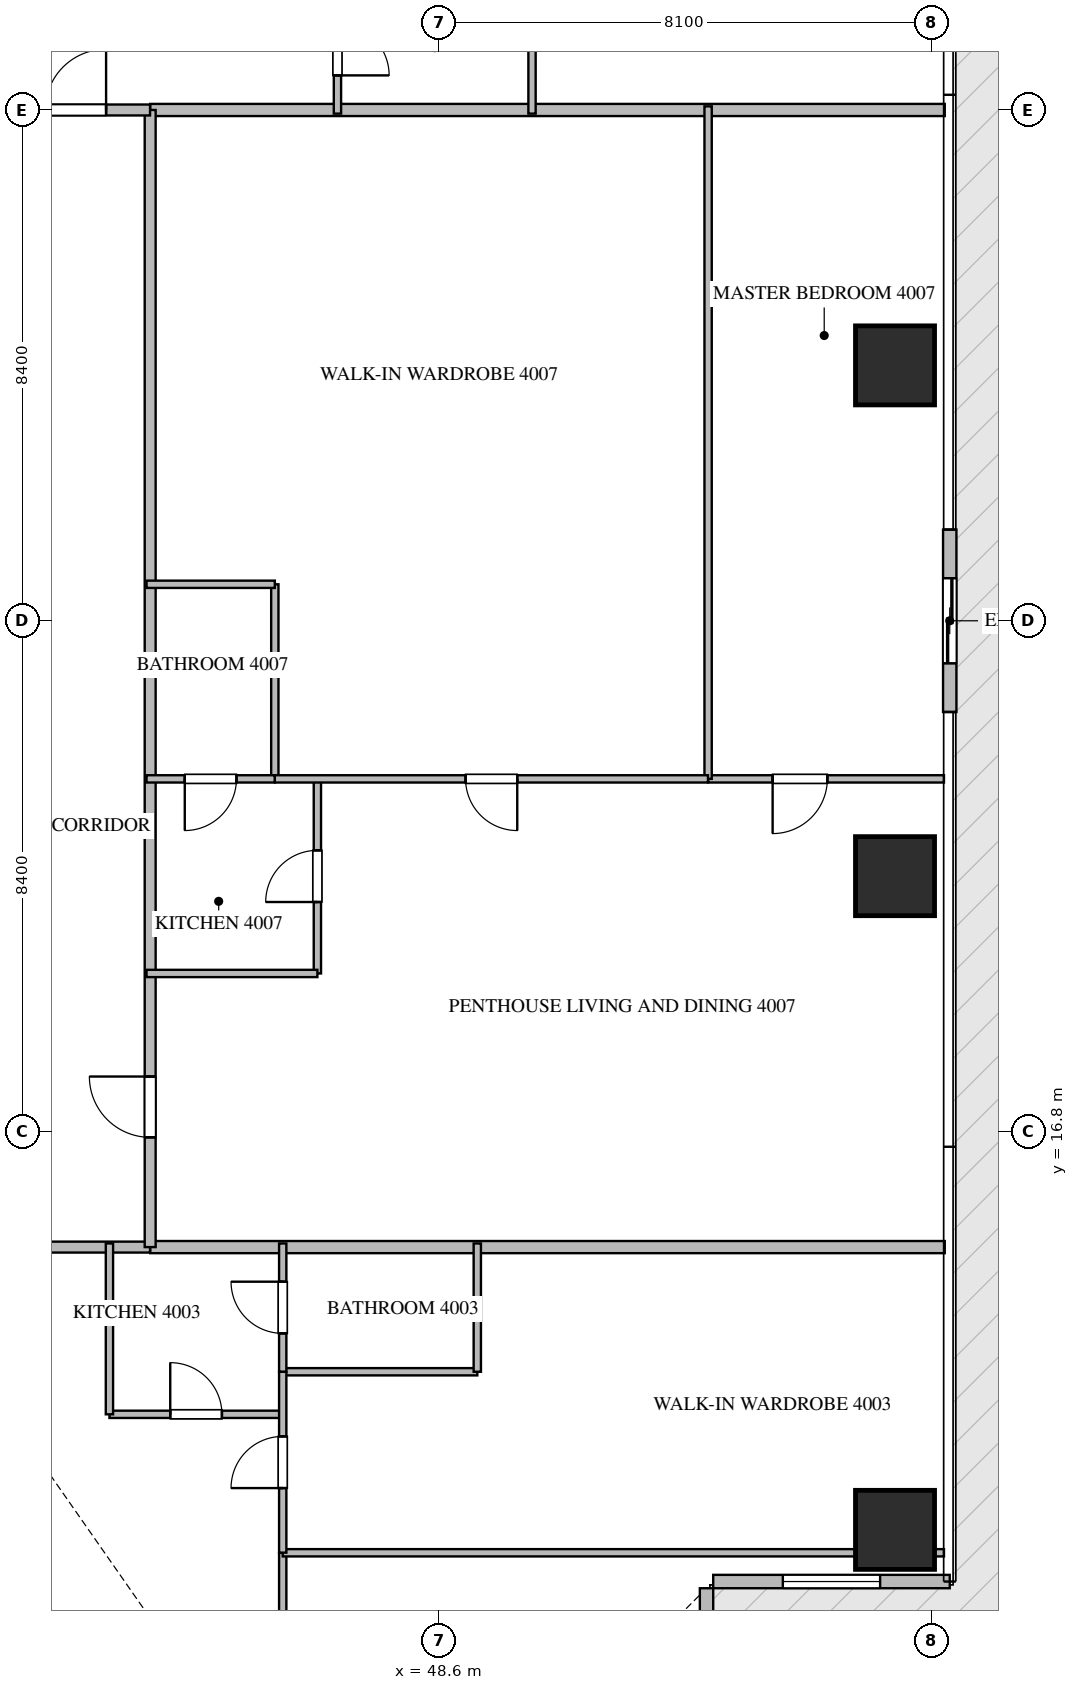
"""IFC4 building model, lengths in metres.
Left out: names, types, materials, properties, quantities, classifications, styles, units other than length and angle.
Written with IfcOpenShell. Run it as: python <this file> out.ifc"""

import sys

from ifc_helpers import new_model, si_unit, direction, frame, frame_2d, origin, origin_2d, place, context, subcontext, project, spatial, rectangle, extrude, source, transform, mapped, element, fill, save


model = new_model("IFC4")
c1 = context("Model", 3, precision=1e-05, world=origin(), true_north=direction((0.0, 1.0)))
c2 = subcontext(c1, "Body", "Model", "MODEL_VIEW")
j1 = project(units=[si_unit("LENGTHUNIT", "METRE"), si_unit("PLANEANGLEUNIT", "RADIAN")], contexts=[c1])
p1 = place(None, origin())
s1 = spatial("IfcSite", under=j1, at=p1, CompositionType="ELEMENT")
p2 = place(p1, origin())
s2 = spatial("IfcBuilding", under=s1, at=p2, CompositionType="ELEMENT")
p3 = place(p2, frame((0.0, 0.0, 161.4)))
s3 = spatial("IfcBuildingStorey", under=s2, at=p3, CompositionType="ELEMENT", Elevation=161.4)
m1 = source(origin(), c2, "Body", "SweptSolid", [
    extrude(rectangle(XDim=1.3, YDim=1.3, at=origin_2d()), origin(), (0.0, 0.0, 1.0), 3.75),
])
for number, where, z_axis, x_axis in (
    (1, (56.1, 10.25, -0.26), (0.0, 0.0, 1.0), (1.0, 0.0, 0.0)),
    (2, (56.1, 21.0, -0.26), (0.0, 0.0, 1.0), (1.0, 0.0, 0.0)),
    (3, (56.1, 29.4, -0.26), (0.0, 0.0, 1.0), (1.0, 0.0, 0.0)),
):
    element("IfcColumn", number, at=place(p3, frame(where, z_axis=z_axis, x_axis=x_axis)), inside=s3, PredefinedType="COLUMN", context=c2, shape_type="MappedRepresentation", body=[
        mapped(m1, transform((0.0, 0.0, 0.0), scale=1.0)),
    ])
p4 = place(p3, frame((53.0, 5.51, 0.0), z_axis=(0.0, 0.0, 1.0), x_axis=(0.0, 1.0, 0.0)))
e4 = element("IfcWall", 4, at=p4, inside=s3, PredefinedType="ELEMENTEDWALL", context=c2, shape_type="SweptSolid", body=[
    extrude(rectangle(XDim=3.78, YDim=0.22, at=frame_2d((1.89, 0.0))), origin(), (0.0, 0.0, 1.0), 3.475),
])
p5 = place(p4, frame((1.09, 0.0, 0.65)))
e5 = element("IfcOpeningElement", 5, at=p5, cuts=e4, PredefinedType="OPENING", context=c2, shape_type="SweptSolid", body=[
    extrude(rectangle(XDim=1.6, YDim=2.1, at=frame_2d((0.8, 1.05))), frame((0.0, 0.12, 0.0), z_axis=(0.0, -1.0, 0.0), x_axis=(1.0, 0.0, 0.0)), (0.0, 0.0, 1.0), 0.24),
])
p6 = place(p3, frame((53.11, 9.4, 0.0), z_axis=(0.0, 0.0, 1.0), x_axis=(1.0, 0.0, 0.0)))
e6 = element("IfcWall", 6, at=p6, inside=s3, PredefinedType="ELEMENTEDWALL", context=c2, shape_type="SweptSolid", body=[
    extrude(rectangle(XDim=3.89, YDim=0.22, at=frame_2d((1.945, 0.0))), origin(), (0.0, 0.0, 1.0), 3.475),
])
p7 = place(p6, frame((1.145, 0.0, 0.65)))
e7 = element("IfcOpeningElement", 7, at=p7, cuts=e6, PredefinedType="OPENING", context=c2, shape_type="SweptSolid", body=[
    extrude(rectangle(XDim=1.6, YDim=2.1, at=frame_2d((0.8, 1.05))), frame((0.0, 0.12, 0.0), z_axis=(0.0, -1.0, 0.0), x_axis=(1.0, 0.0, 0.0)), (0.0, 0.0, 1.0), 0.24),
])
p8 = place(p3, frame((57.0, 23.7, 0.0), z_axis=(0.0, 0.0, 1.0), x_axis=(0.0, 1.0, 0.0)))
e8 = element("IfcWall", 8, at=p8, inside=s3, PredefinedType="ELEMENTEDWALL", context=c2, shape_type="SweptSolid", body=[
    extrude(rectangle(XDim=3.0, YDim=0.22, at=frame_2d((1.5, 0.0))), origin(), (0.0, 0.0, 1.0), 3.475),
])
p9 = place(p8, frame((0.8, 0.0, 0.0)))
e9 = element("IfcOpeningElement", 9, at=p9, cuts=e8, PredefinedType="OPENING", context=c2, shape_type="SweptSolid", body=[
    extrude(rectangle(XDim=1.4, YDim=2.25, at=frame_2d((0.7, 1.125))), frame((0.0, 0.12, 0.0), z_axis=(0.0, -1.0, 0.0), x_axis=(1.0, 0.0, 0.0)), (0.0, 0.0, 1.0), 0.24),
])
for number, where, z_axis, x_axis in (
    (10, (43.85, 14.9, 0.0), (0.0, 0.0, 1.0), (1.0, 0.0, 0.0)),
    (11, (43.85, 33.6, 0.0), (0.0, 0.0, 1.0), (1.0, 0.0, 0.0)),
):
    element("IfcWall", number, at=place(p3, frame(where, z_axis=z_axis, x_axis=x_axis)), inside=s3, PredefinedType="PARTITIONING", context=c2, shape_type="SweptSolid", body=[
        extrude(rectangle(XDim=13.068, YDim=0.2, at=frame_2d((6.534, 0.0))), origin(), (0.0, 0.0, 1.0), 3.49),
    ])
p10 = place(p3, frame((20.952, 14.9, 0.0), z_axis=(0.0, 0.0, 1.0), x_axis=(1.0, 0.0, 0.0)))
e12 = element("IfcWall", 12, at=p10, inside=s3, PredefinedType="PARTITIONING", context=c2, shape_type="SweptSolid", body=[
    extrude(rectangle(XDim=22.896, YDim=0.18, at=frame_2d((11.448, 0.0))), origin(), (0.0, 0.0, 1.0), 3.49),
])
p11 = place(p10, frame((2.19, 0.0, 0.0)))
e13 = element("IfcOpeningElement", 13, at=p11, cuts=e12, PredefinedType="OPENING", context=c2, shape_type="SweptSolid", body=[
    extrude(rectangle(XDim=1.0, YDim=2.15, at=frame_2d((0.5, 1.075))), frame((0.0, 0.1, 0.0), z_axis=(0.0, -1.0, 0.0), x_axis=(1.0, 0.0, 0.0)), (0.0, 0.0, 1.0), 0.2),
])
p12 = place(p10, frame((15.24, 0.0, 0.0)))
e14 = element("IfcOpeningElement", 14, at=p12, cuts=e12, PredefinedType="OPENING", context=c2, shape_type="SweptSolid", body=[
    extrude(rectangle(XDim=1.0, YDim=2.15, at=frame_2d((0.5, 1.075))), frame((0.0, 0.1, 0.0), z_axis=(0.0, -1.0, 0.0), x_axis=(1.0, 0.0, 0.0)), (0.0, 0.0, 1.0), 0.2),
])
p13 = place(p10, frame((19.706, 0.0, 0.0)))
e15 = element("IfcOpeningElement", 15, at=p13, cuts=e12, PredefinedType="OPENING", context=c2, shape_type="SweptSolid", body=[
    extrude(rectangle(XDim=1.0, YDim=2.15, at=frame_2d((0.5, 1.075))), frame((0.0, 0.1, 0.0), z_axis=(0.0, -1.0, 0.0), x_axis=(1.0, 0.0, 0.0)), (0.0, 0.0, 1.0), 0.2),
])
p14 = place(p3, frame((43.85, 14.9, 0.0), z_axis=(0.0, 0.0, 1.0), x_axis=(0.0, 1.0, 0.0)))
e16 = element("IfcWall", 16, at=p14, inside=s3, PredefinedType="PARTITIONING", context=c2, shape_type="SweptSolid", body=[
    extrude(rectangle(XDim=18.7, YDim=0.18, at=frame_2d((9.35, 0.0))), origin(), (0.0, 0.0, 1.0), 3.49),
])
p15 = place(p14, frame((1.805, 0.0, 0.0)))
e17 = element("IfcOpeningElement", 17, at=p15, cuts=e16, PredefinedType="OPENING", context=c2, shape_type="SweptSolid", body=[
    extrude(rectangle(XDim=1.0, YDim=2.15, at=frame_2d((0.5, 1.075))), frame((0.0, 0.1, 0.0), z_axis=(0.0, -1.0, 0.0), x_axis=(1.0, 0.0, 0.0)), (0.0, 0.0, 1.0), 0.2),
])
p16 = place(p3, frame((41.402, 33.6, 0.0), z_axis=(0.0, 0.0, 1.0), x_axis=(1.0, 0.0, 0.0)))
e18 = element("IfcWall", 18, at=p16, inside=s3, PredefinedType="PARTITIONING", context=c2, shape_type="SweptSolid", body=[
    extrude(rectangle(XDim=2.446, YDim=0.18, at=frame_2d((1.223, 0.0))), origin(), (0.0, 0.0, 1.0), 3.49),
])
p17 = place(p16, frame((0.723, 0.0, 0.0)))
e19 = element("IfcOpeningElement", 19, at=p17, cuts=e18, PredefinedType="OPENING", context=c2, shape_type="SweptSolid", body=[
    extrude(rectangle(XDim=1.0, YDim=2.15, at=frame_2d((0.5, 1.075))), frame((0.0, 0.1, 0.0), z_axis=(0.0, -1.0, 0.0), x_axis=(1.0, 0.0, 0.0)), (0.0, 0.0, 1.0), 0.2),
])
p18 = place(p3, frame((43.18, 12.15, 0.0), z_axis=(0.0, 0.0, 1.0), x_axis=(1.0, 0.0, 0.0)))
e20 = element("IfcWall", 20, at=p18, inside=s3, PredefinedType="PARTITIONING", context=c2, shape_type="SweptSolid", body=[
    extrude(rectangle(XDim=2.85, YDim=0.12, at=frame_2d((1.425, 0.0))), origin(), (0.0, 0.0, 1.0), 3.49),
])
p19 = place(p18, frame((1.0, 0.0, 0.0)))
e21 = element("IfcOpeningElement", 21, at=p19, cuts=e20, PredefinedType="OPENING", context=c2, shape_type="SweptSolid", body=[
    extrude(rectangle(XDim=0.85, YDim=2.1, at=frame_2d((0.425, 1.05))), frame((0.0, 0.07, 0.0), z_axis=(0.0, -1.0, 0.0), x_axis=(1.0, 0.0, 0.0)), (0.0, 0.0, 1.0), 0.14),
])
p20 = place(p3, frame((43.18, 12.15, 0.0), z_axis=(0.0, 0.0, 1.0), x_axis=(0.0, 1.0, 0.0)))
e22 = element("IfcWall", 22, at=p20, inside=s3, PredefinedType="PARTITIONING", context=c2, shape_type="SweptSolid", body=[
    extrude(rectangle(XDim=2.81, YDim=0.12, at=frame_2d((1.405, 0.0))), origin(), (0.0, 0.0, 1.0), 3.49),
])
p21 = place(p3, frame((46.03, 1.495, 0.0), z_axis=(0.0, 0.0, 1.0), x_axis=(0.0, 1.0, 0.0)))
e23 = element("IfcWall", 23, at=p21, inside=s3, PredefinedType="PARTITIONING", context=c2, shape_type="SweptSolid", body=[
    extrude(rectangle(XDim=8.378, YDim=0.12, at=frame_2d((4.189, 0.0))), origin(), (0.0, 0.0, 1.0), 3.49),
])
p22 = place(p21, frame((4.113, 0.0, 0.0)))
e24 = element("IfcOpeningElement", 24, at=p22, cuts=e23, PredefinedType="OPENING", context=c2, shape_type="SweptSolid", body=[
    extrude(rectangle(XDim=0.9, YDim=2.1, at=frame_2d((0.45, 1.05))), frame((0.0, 0.07, 0.0), z_axis=(0.0, -1.0, 0.0), x_axis=(1.0, 0.0, 0.0)), (0.0, 0.0, 1.0), 0.14),
])
p23 = place(p3, frame((46.03, 9.873, 0.0), z_axis=(0.0, 0.0, 1.0), x_axis=(1.0, 0.0, 0.0)))
e25 = element("IfcWall", 25, at=p23, inside=s3, PredefinedType="PARTITIONING", context=c2, shape_type="SweptSolid", body=[
    extrude(rectangle(XDim=10.875, YDim=0.12, at=frame_2d((5.438, 0.0))), origin(), (0.0, 0.0, 1.0), 3.49),
])
p24 = place(p3, frame((46.03, 12.85, 0.0), z_axis=(0.0, 0.0, 1.0), x_axis=(1.0, 0.0, 0.0)))
e26 = element("IfcWall", 26, at=p24, inside=s3, PredefinedType="PARTITIONING", context=c2, shape_type="SweptSolid", body=[
    extrude(rectangle(XDim=3.2, YDim=0.12, at=frame_2d((1.6, 0.0))), origin(), (0.0, 0.0, 1.0), 3.49),
])
p25 = place(p3, frame((49.23, 12.85, 0.0), z_axis=(0.0, 0.0, 1.0), x_axis=(0.0, 1.0, 0.0)))
e27 = element("IfcWall", 27, at=p25, inside=s3, PredefinedType="PARTITIONING", context=c2, shape_type="SweptSolid", body=[
    extrude(rectangle(XDim=2.11, YDim=0.12, at=frame_2d((1.055, 0.0))), origin(), (0.0, 0.0, 1.0), 3.49),
])
p26 = place(p3, frame((46.03, 9.875, 0.0), z_axis=(0.0, 0.0, 1.0), x_axis=(0.0, 1.0, 0.0)))
e28 = element("IfcWall", 28, at=p26, inside=s3, PredefinedType="PARTITIONING", context=c2, shape_type="SweptSolid", body=[
    extrude(rectangle(XDim=2.975, YDim=0.12, at=frame_2d((1.488, 0.0))), origin(), (0.0, 0.0, 1.0), 3.49),
])
p27 = place(p26, frame((1.062, 0.0, 0.0)))
e29 = element("IfcOpeningElement", 29, at=p27, cuts=e28, PredefinedType="OPENING", context=c2, shape_type="SweptSolid", body=[
    extrude(rectangle(XDim=0.85, YDim=2.1, at=frame_2d((0.425, 1.05))), frame((0.0, 0.07, 0.0), z_axis=(0.0, -1.0, 0.0), x_axis=(1.0, 0.0, 0.0)), (0.0, 0.0, 1.0), 0.14),
])
p28 = place(p3, frame((46.03, 12.852, 0.0), z_axis=(0.0, 0.0, 1.0), x_axis=(0.0, 1.0, 0.0)))
e30 = element("IfcWall", 30, at=p28, inside=s3, PredefinedType="PARTITIONING", context=c2, shape_type="SweptSolid", body=[
    extrude(rectangle(XDim=2.108, YDim=0.12, at=frame_2d((1.054, 0.0))), origin(), (0.0, 0.0, 1.0), 3.49),
])
p29 = place(p28, frame((0.629, 0.0, 0.0)))
e31 = element("IfcOpeningElement", 31, at=p29, cuts=e30, PredefinedType="OPENING", context=c2, shape_type="SweptSolid", body=[
    extrude(rectangle(XDim=0.85, YDim=2.1, at=frame_2d((0.425, 1.05))), frame((0.0, 0.07, 0.0), z_axis=(0.0, -1.0, 0.0), x_axis=(1.0, 0.0, 0.0)), (0.0, 0.0, 1.0), 0.14),
])
p30 = place(p3, frame((50.13, 35.65, 0.0), z_axis=(0.0, 0.0, 1.0), x_axis=(0.0, -1.0, 0.0)))
e32 = element("IfcWall", 32, at=p30, inside=s3, PredefinedType="PARTITIONING", context=c2, shape_type="SweptSolid", body=[
    extrude(rectangle(XDim=2.11, YDim=0.12, at=frame_2d((1.055, 0.0))), origin(), (0.0, 0.0, 1.0), 3.49),
])
p31 = place(p3, frame((46.93, 35.648, 0.0), z_axis=(0.0, 0.0, 1.0), x_axis=(0.0, -1.0, 0.0)))
e33 = element("IfcWall", 33, at=p31, inside=s3, PredefinedType="PARTITIONING", context=c2, shape_type="SweptSolid", body=[
    extrude(rectangle(XDim=2.108, YDim=0.12, at=frame_2d((1.054, 0.0))), origin(), (0.0, 0.0, 1.0), 3.49),
])
p32 = place(p31, frame((0.629, 0.0, 0.0)))
e34 = element("IfcOpeningElement", 34, at=p32, cuts=e33, PredefinedType="OPENING", context=c2, shape_type="SweptSolid", body=[
    extrude(rectangle(XDim=0.85, YDim=2.1, at=frame_2d((0.425, 1.05))), frame((0.0, 0.07, 0.0), z_axis=(0.0, -1.0, 0.0), x_axis=(1.0, 0.0, 0.0)), (0.0, 0.0, 1.0), 0.14),
])
p33 = place(p3, frame((46.6, 19.4, 0.0), z_axis=(0.0, 0.0, 1.0), x_axis=(0.0, 1.0, 0.0)))
e35 = element("IfcWall", 35, at=p33, inside=s3, PredefinedType="PARTITIONING", context=c2, shape_type="SweptSolid", body=[
    extrude(rectangle(XDim=3.2, YDim=0.12, at=frame_2d((1.6, 0.0))), origin(), (0.0, 0.0, 1.0), 3.49),
])
p34 = place(p33, frame((1.175, 0.0, 0.0)))
e36 = element("IfcOpeningElement", 36, at=p34, cuts=e35, PredefinedType="OPENING", context=c2, shape_type="SweptSolid", body=[
    extrude(rectangle(XDim=0.85, YDim=2.1, at=frame_2d((0.425, 1.05))), frame((0.0, 0.07, 0.0), z_axis=(0.0, -1.0, 0.0), x_axis=(1.0, 0.0, 0.0)), (0.0, 0.0, 1.0), 0.14),
])
p35 = place(p3, frame((46.6, 19.4, 0.0), z_axis=(0.0, 0.0, 1.0), x_axis=(-1.0, 0.0, 0.0)))
e37 = element("IfcWall", 37, at=p35, inside=s3, PredefinedType="PARTITIONING", context=c2, shape_type="SweptSolid", body=[
    extrude(rectangle(XDim=2.81, YDim=0.12, at=frame_2d((1.405, 0.0))), origin(), (0.0, 0.0, 1.0), 3.49),
])
p36 = place(p3, frame((56.905, 22.6, 0.0), z_axis=(0.0, 0.0, 1.0), x_axis=(-1.0, 0.0, 0.0)))
e38 = element("IfcWall", 38, at=p36, inside=s3, PredefinedType="PARTITIONING", context=c2, shape_type="SweptSolid", body=[
    extrude(rectangle(XDim=3.879, YDim=0.12, at=frame_2d((1.939, 0.0))), origin(), (0.0, 0.0, 1.0), 3.49),
])
p37 = place(p36, frame((1.918, 0.0, 0.0)))
e39 = element("IfcOpeningElement", 39, at=p37, cuts=e38, PredefinedType="OPENING", context=c2, shape_type="SweptSolid", body=[
    extrude(rectangle(XDim=0.9, YDim=2.1, at=frame_2d((0.45, 1.05))), frame((0.0, 0.07, 0.0), z_axis=(0.0, -1.0, 0.0), x_axis=(1.0, 0.0, 0.0)), (0.0, 0.0, 1.0), 0.14),
])
p38 = place(p3, frame((53.026, 22.6, 0.0), z_axis=(0.0, 0.0, 1.0), x_axis=(0.0, 1.0, 0.0)))
e40 = element("IfcWall", 40, at=p38, inside=s3, PredefinedType="PARTITIONING", context=c2, shape_type="SweptSolid", body=[
    extrude(rectangle(XDim=11.06, YDim=0.12, at=frame_2d((5.53, 0.0))), origin(), (0.0, 0.0, 1.0), 3.49),
])
p39 = place(p3, frame((45.9, 22.6, 0.0), z_axis=(0.0, 0.0, 1.0), x_axis=(0.0, 1.0, 0.0)))
e41 = element("IfcWall", 41, at=p39, inside=s3, PredefinedType="PARTITIONING", context=c2, shape_type="SweptSolid", body=[
    extrude(rectangle(XDim=3.2, YDim=0.12, at=frame_2d((1.6, 0.0))), origin(), (0.0, 0.0, 1.0), 3.49),
])
p40 = place(p3, frame((45.9, 25.8, 0.0), z_axis=(0.0, 0.0, 1.0), x_axis=(-1.0, 0.0, 0.0)))
e42 = element("IfcWall", 42, at=p40, inside=s3, PredefinedType="PARTITIONING", context=c2, shape_type="SweptSolid", body=[
    extrude(rectangle(XDim=2.11, YDim=0.12, at=frame_2d((1.055, 0.0))), origin(), (0.0, 0.0, 1.0), 3.49),
])
p41 = place(p3, frame((53.024, 22.6, 0.0), z_axis=(0.0, 0.0, 1.0), x_axis=(-1.0, 0.0, 0.0)))
e43 = element("IfcWall", 43, at=p41, inside=s3, PredefinedType="PARTITIONING", context=c2, shape_type="SweptSolid", body=[
    extrude(rectangle(XDim=7.124, YDim=0.12, at=frame_2d((3.562, 0.0))), origin(), (0.0, 0.0, 1.0), 3.49),
])
p42 = place(p41, frame((3.137, 0.0, 0.0)))
e44 = element("IfcOpeningElement", 44, at=p42, cuts=e43, PredefinedType="OPENING", context=c2, shape_type="SweptSolid", body=[
    extrude(rectangle(XDim=0.85, YDim=2.1, at=frame_2d((0.425, 1.05))), frame((0.0, 0.07, 0.0), z_axis=(0.0, -1.0, 0.0), x_axis=(1.0, 0.0, 0.0)), (0.0, 0.0, 1.0), 0.14),
])
p43 = place(p3, frame((45.898, 22.6, 0.0), z_axis=(0.0, 0.0, 1.0), x_axis=(-1.0, 0.0, 0.0)))
e45 = element("IfcWall", 45, at=p43, inside=s3, PredefinedType="PARTITIONING", context=c2, shape_type="SweptSolid", body=[
    extrude(rectangle(XDim=2.108, YDim=0.12, at=frame_2d((1.054, 0.0))), origin(), (0.0, 0.0, 1.0), 3.49),
])
p44 = place(p43, frame((0.629, 0.0, 0.0)))
e46 = element("IfcOpeningElement", 46, at=p44, cuts=e45, PredefinedType="OPENING", context=c2, shape_type="SweptSolid", body=[
    extrude(rectangle(XDim=0.85, YDim=2.1, at=frame_2d((0.425, 1.05))), frame((0.0, 0.07, 0.0), z_axis=(0.0, -1.0, 0.0), x_axis=(1.0, 0.0, 0.0)), (0.0, 0.0, 1.0), 0.14),
])
m2 = source(origin(), c2, "Body", "SweptSolid", [
    extrude(rectangle(XDim=1.6, YDim=2.1, at=frame_2d((0.8, 1.05))), frame((0.0, 0.03, 0.0), z_axis=(0.0, -1.0, 0.0), x_axis=(1.0, 0.0, 0.0)), (0.0, 0.0, 1.0), 0.06),
])
p45 = place(p7, origin())
e47 = element("IfcWindow", 47, at=p45, inside=s3, PartitioningType="SINGLE_PANEL", PredefinedType="WINDOW", context=c2, shape_type="MappedRepresentation", body=[
    mapped(m2, transform((0.0, 0.0, 0.0), scale=1.0)),
])
fill(e7, e47)
m3 = source(origin(), c2, "Body", "SweptSolid", [
    extrude(rectangle(XDim=1.4, YDim=2.25, at=frame_2d((0.7, 1.125))), frame((0.0, 0.025, 0.0), z_axis=(0.0, -1.0, 0.0), x_axis=(1.0, 0.0, 0.0)), (0.0, 0.0, 1.0), 0.05),
])
p46 = place(p9, origin())
e48 = element("IfcDoor", 48, at=p46, inside=s3, OperationType="SLIDING_TO_LEFT", PredefinedType="DOOR", context=c2, shape_type="MappedRepresentation", body=[
    mapped(m3, transform((0.0, 0.0, 0.0), scale=1.0)),
])
fill(e9, e48)
m4 = source(origin(), c2, "Body", "SweptSolid", [
    extrude(rectangle(XDim=1.0, YDim=2.15, at=frame_2d((0.5, 1.075))), frame((0.0, 0.025, 0.0), z_axis=(0.0, -1.0, 0.0), x_axis=(1.0, 0.0, 0.0)), (0.0, 0.0, 1.0), 0.05),
])
p47 = place(p15, origin())
e49 = element("IfcDoor", 49, at=p47, inside=s3, OperationType="SINGLE_SWING_RIGHT", PredefinedType="DOOR", context=c2, shape_type="MappedRepresentation", body=[
    mapped(m4, transform((0.0, 0.0, 0.0), scale=1.0)),
])
fill(e17, e49)
p48 = place(p17, origin())
e50 = element("IfcDoor", 50, at=p48, inside=s3, OperationType="SINGLE_SWING_RIGHT", PredefinedType="DOOR", context=c2, shape_type="MappedRepresentation", body=[
    mapped(m4, transform((0.0, 0.0, 0.0), scale=1.0)),
])
fill(e19, e50)
m5 = source(origin(), c2, "Body", "SweptSolid", [
    extrude(rectangle(XDim=0.85, YDim=2.1, at=frame_2d((0.425, 1.05))), frame((0.0, 0.025, 0.0), z_axis=(0.0, -1.0, 0.0), x_axis=(1.0, 0.0, 0.0)), (0.0, 0.0, 1.0), 0.05),
])
p49 = place(p19, origin())
e51 = element("IfcDoor", 51, at=p49, inside=s3, OperationType="SINGLE_SWING_LEFT", PredefinedType="DOOR", context=c2, shape_type="MappedRepresentation", body=[
    mapped(m5, transform((0.0, 0.0, 0.0), scale=1.0)),
])
fill(e21, e51)
p50 = place(p27, origin())
e52 = element("IfcDoor", 52, at=p50, inside=s3, OperationType="SINGLE_SWING_LEFT", PredefinedType="DOOR", context=c2, shape_type="MappedRepresentation", body=[
    mapped(m5, transform((0.0, 0.0, 0.0), scale=1.0)),
])
fill(e29, e52)
p51 = place(p29, origin())
e53 = element("IfcDoor", 53, at=p51, inside=s3, OperationType="SINGLE_SWING_RIGHT", PredefinedType="DOOR", context=c2, shape_type="MappedRepresentation", body=[
    mapped(m5, transform((0.0, 0.0, 0.0), scale=1.0)),
])
fill(e31, e53)
p52 = place(p32, origin())
e54 = element("IfcDoor", 54, at=p52, inside=s3, OperationType="SINGLE_SWING_RIGHT", PredefinedType="DOOR", context=c2, shape_type="MappedRepresentation", body=[
    mapped(m5, transform((0.0, 0.0, 0.0), scale=1.0)),
])
fill(e34, e54)
p53 = place(p34, origin())
e55 = element("IfcDoor", 55, at=p53, inside=s3, OperationType="SINGLE_SWING_LEFT", PredefinedType="DOOR", context=c2, shape_type="MappedRepresentation", body=[
    mapped(m5, transform((0.0, 0.0, 0.0), scale=1.0)),
])
fill(e36, e55)
m6 = source(origin(), c2, "Body", "SweptSolid", [
    extrude(rectangle(XDim=0.9, YDim=2.1, at=frame_2d((0.45, 1.05))), frame((0.0, 0.025, 0.0), z_axis=(0.0, -1.0, 0.0), x_axis=(1.0, 0.0, 0.0)), (0.0, 0.0, 1.0), 0.05),
])
p54 = place(p37, origin())
e56 = element("IfcDoor", 56, at=p54, inside=s3, OperationType="SINGLE_SWING_RIGHT", PredefinedType="DOOR", context=c2, shape_type="MappedRepresentation", body=[
    mapped(m6, transform((0.0, 0.0, 0.0), scale=1.0)),
])
fill(e39, e56)
p55 = place(p42, origin())
e57 = element("IfcDoor", 57, at=p55, inside=s3, OperationType="SINGLE_SWING_LEFT", PredefinedType="DOOR", context=c2, shape_type="MappedRepresentation", body=[
    mapped(m5, transform((0.0, 0.0, 0.0), scale=1.0)),
])
fill(e44, e57)
p56 = place(p44, origin())
e58 = element("IfcDoor", 58, at=p56, inside=s3, OperationType="SINGLE_SWING_RIGHT", PredefinedType="DOOR", context=c2, shape_type="MappedRepresentation", body=[
    mapped(m5, transform((0.0, 0.0, 0.0), scale=1.0)),
])
fill(e46, e58)
save(model, sys.argv[1])
